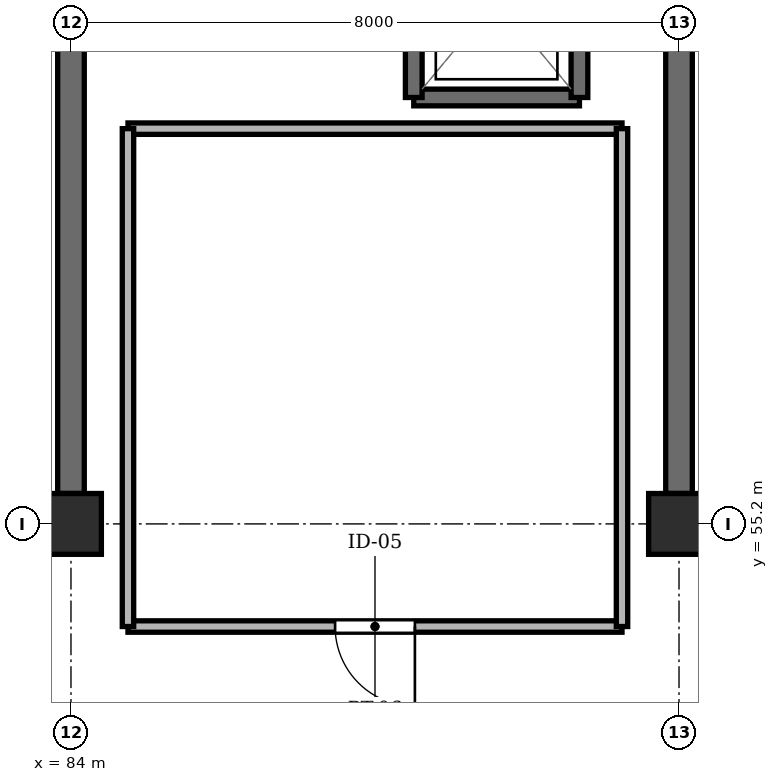
"""IFC4 building model, lengths in metres.
Left out: names, types, materials, properties, quantities, classifications, styles, units other than length and angle.
Written with IfcOpenShell. Run it as: python <this file> out.ifc"""

import sys

from ifc_helpers import new_model, si_unit, direction, frame, frame_2d, origin, origin_2d, place, context, subcontext, project, spatial, rectangle, extrude, element, fill, save


model = new_model("IFC4")
c1 = context("Model", 3, precision=1e-05, world=origin(), true_north=direction((0.0, 1.0)))
c2 = subcontext(c1, "Body", "Model", "MODEL_VIEW")
j1 = project(units=[si_unit("LENGTHUNIT", "METRE"), si_unit("PLANEANGLEUNIT", "RADIAN")], contexts=[c1])
p1 = place(None, origin())
s1 = spatial("IfcSite", under=j1, at=p1, CompositionType="ELEMENT")
p2 = place(p1, origin())
s2 = spatial("IfcBuilding", under=s1, at=p2, CompositionType="ELEMENT")
p3 = place(p2, frame((0.0, 0.0, 60.05)))
s3 = spatial("IfcBuildingStorey", under=s2, at=p3, CompositionType="ELEMENT", Elevation=60.05)
for number, where, z_axis, x_axis in (
    (1, (84.0, 55.2, -0.21), (0.0, 0.0, 1.0), (1.0, 0.0, 0.0)),
    (2, (92.0, 55.2, -0.21), (0.0, 0.0, 1.0), (1.0, 0.0, 0.0)),
):
    element("IfcColumn", number, at=place(p3, frame(where, z_axis=z_axis, x_axis=x_axis)), inside=s3, PredefinedType="COLUMN", context=c2, shape_type="SweptSolid", body=[
        extrude(rectangle(XDim=0.8, YDim=0.8, at=origin_2d()), origin(), (0.0, 0.0, 1.0), 3.25),
    ])
for number, where, z_axis, x_axis in (
    (3, (84.0, 55.6, 0.0), (0.0, 0.0, 1.0), (0.0, 1.0, 0.0)),
    (4, (92.0, 55.6, 0.0), (0.0, 0.0, 1.0), (0.0, 1.0, 0.0)),
):
    element("IfcWall", number, at=place(p3, frame(where, z_axis=z_axis, x_axis=x_axis)), inside=s3, PredefinedType="SHEAR", context=c2, shape_type="SweptSolid", body=[
        extrude(rectangle(XDim=6.45, YDim=0.35, at=frame_2d((3.225, 0.0))), origin(), (0.0, 0.0, 1.0), 3.04),
    ])
p4 = place(p3, frame((88.51, 60.81, 0.0), z_axis=(0.0, 0.0, 1.0), x_axis=(1.0, 0.0, 0.0)))
e5 = element("IfcWall", 5, at=p4, inside=s3, PredefinedType="SHEAR", context=c2, shape_type="SweptSolid", body=[
    extrude(rectangle(XDim=2.18, YDim=0.22, at=frame_2d((1.09, 0.0))), origin(), (0.0, 0.0, 1.0), 3.04),
])
for number, where, z_axis, x_axis in (
    (6, (88.51, 63.39, 0.0), (0.0, 0.0, 1.0), (0.0, -1.0, 0.0)),
    (7, (90.69, 60.81, 0.0), (0.0, 0.0, 1.0), (0.0, 1.0, 0.0)),
):
    element("IfcWall", number, at=place(p3, frame(where, z_axis=z_axis, x_axis=x_axis)), inside=s3, PredefinedType="SHEAR", context=c2, shape_type="SweptSolid", body=[
        extrude(rectangle(XDim=2.58, YDim=0.22, at=frame_2d((1.29, 0.0))), origin(), (0.0, 0.0, 1.0), 3.04),
    ])
p5 = place(p3, frame((84.75, 53.85, 0.0), z_axis=(0.0, 0.0, 1.0), x_axis=(1.0, 0.0, 0.0)))
e8 = element("IfcWall", 8, at=p5, inside=s3, PredefinedType="PARTITIONING", context=c2, shape_type="SweptSolid", body=[
    extrude(rectangle(XDim=6.5, YDim=0.15, at=frame_2d((3.25, 0.0))), origin(), (0.0, 0.0, 1.0), 2.53),
])
p6 = place(p5, frame((2.725, 0.0, 0.0)))
e9 = element("IfcOpeningElement", 9, at=p6, cuts=e8, PredefinedType="OPENING", context=c2, shape_type="SweptSolid", body=[
    extrude(rectangle(XDim=1.05, YDim=2.15, at=frame_2d((0.525, 1.075))), frame((0.0, 0.087, 0.0), z_axis=(0.0, -1.0, 0.0), x_axis=(1.0, 0.0, 0.0)), (0.0, 0.0, 1.0), 0.174),
])
p7 = place(p3, frame((84.75, 60.4, 0.0), z_axis=(0.0, 0.0, 1.0), x_axis=(1.0, 0.0, 0.0)))
e10 = element("IfcWall", 10, at=p7, inside=s3, PredefinedType="PARTITIONING", context=c2, shape_type="SweptSolid", body=[
    extrude(rectangle(XDim=6.5, YDim=0.15, at=frame_2d((3.25, 0.0))), origin(), (0.0, 0.0, 1.0), 2.53),
])
for number, where, z_axis, x_axis in (
    (11, (84.75, 53.85, 0.0), (0.0, 0.0, 1.0), (0.0, 1.0, 0.0)),
    (12, (91.25, 53.85, 0.0), (0.0, 0.0, 1.0), (0.0, 1.0, 0.0)),
):
    element("IfcWall", number, at=place(p3, frame(where, z_axis=z_axis, x_axis=x_axis)), inside=s3, PredefinedType="PARTITIONING", context=c2, shape_type="SweptSolid", body=[
        extrude(rectangle(XDim=6.55, YDim=0.15, at=frame_2d((3.275, 0.0))), origin(), (0.0, 0.0, 1.0), 2.53),
    ])
p8 = place(p6, frame((1.05, 0.0, 0.0), z_axis=(0.0, 0.0, 1.0), x_axis=(-1.0, 0.0, 0.0)))
e13 = element("IfcDoor", 13, at=p8, inside=s3, OperationType="SINGLE_SWING_RIGHT", PredefinedType="DOOR", context=c2, shape_type="SweptSolid", body=[
    extrude(rectangle(XDim=1.05, YDim=2.15, at=frame_2d((0.525, 1.075))), frame((0.0, 0.025, 0.0), z_axis=(0.0, -1.0, 0.0), x_axis=(1.0, 0.0, 0.0)), (0.0, 0.0, 1.0), 0.05),
])
fill(e9, e13)
save(model, sys.argv[1])
